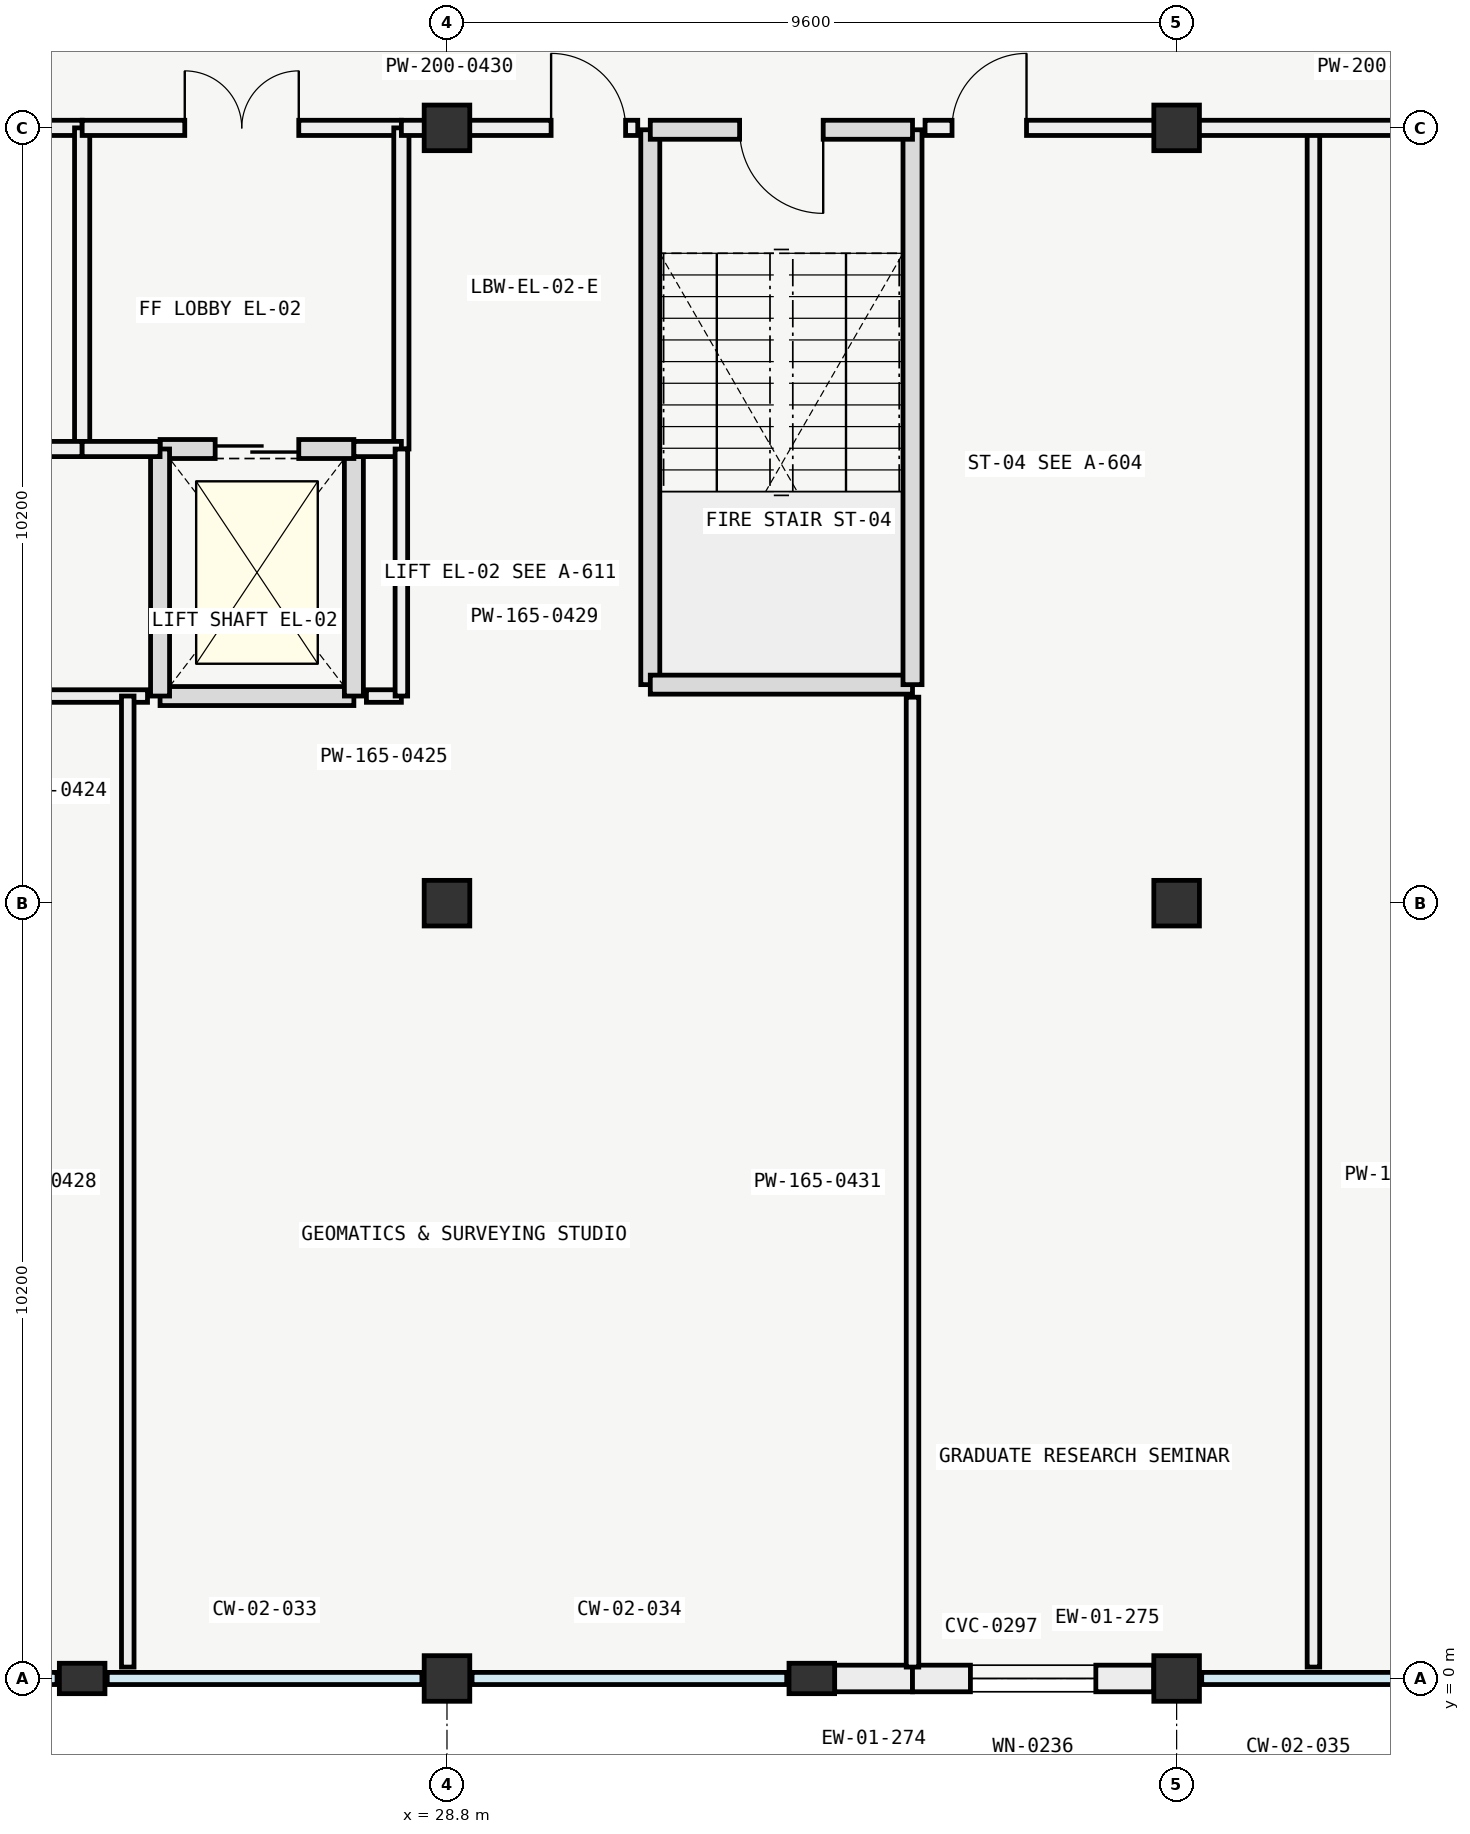
"""IFC4 building model, lengths in metres.
Left out: names, types, materials, properties, quantities, classifications, styles, units other than length and angle.
Written with IfcOpenShell. Run it as: python <this file> out.ifc"""

import sys

from ifc_helpers import new_model, si_unit, direction, frame, frame_2d, origin, origin_2d, place, context, subcontext, project, spatial, rectangle, extrude, element, fill, save


model = new_model("IFC4")
c1 = context("Model", 3, precision=1e-05, world=origin(), true_north=direction((0.0, 1.0)))
c2 = subcontext(c1, "Body", "Model", "MODEL_VIEW")
j1 = project(units=[si_unit("LENGTHUNIT", "METRE"), si_unit("PLANEANGLEUNIT", "RADIAN")], contexts=[c1])
p1 = place(None, origin())
s1 = spatial("IfcSite", under=j1, at=p1, CompositionType="ELEMENT")
p2 = place(p1, origin())
s2 = spatial("IfcBuilding", under=s1, at=p2, CompositionType="ELEMENT")
p3 = place(p2, frame((0.0, 0.0, 18.0)))
s3 = spatial("IfcBuildingStorey", under=s2, at=p3, CompositionType="ELEMENT", Elevation=18.0)
for number, where, z_axis, x_axis in (
    (1, (28.8, 0.0, 0.0), (0.0, 0.0, 1.0), (1.0, 0.0, 0.0)),
    (2, (28.8, 10.2, 0.0), (0.0, 0.0, 1.0), (1.0, 0.0, 0.0)),
    (3, (28.8, 20.4, 0.0), (0.0, 0.0, 1.0), (1.0, 0.0, 0.0)),
    (4, (38.4, 0.0, 0.0), (0.0, 0.0, 1.0), (1.0, 0.0, 0.0)),
    (5, (38.4, 10.2, 0.0), (0.0, 0.0, 1.0), (1.0, 0.0, 0.0)),
    (6, (38.4, 20.4, 0.0), (0.0, 0.0, 1.0), (1.0, 0.0, 0.0)),
):
    element("IfcColumn", number, at=place(p3, frame(where, z_axis=z_axis, x_axis=x_axis)), inside=s3, PredefinedType="COLUMN", context=c2, shape_type="SweptSolid", body=[
        extrude(rectangle(XDim=0.6, YDim=0.6, at=origin_2d()), origin(), (0.0, 0.0, 1.0), 4.2),
    ])
for number, where, z_axis, x_axis in (
    (7, (24.0, 0.0, 0.0), (0.0, 0.0, 1.0), (0.0, 1.0, 0.0)),
    (8, (33.6, 0.0, 0.0), (0.0, 0.0, 1.0), (0.0, 1.0, 0.0)),
):
    element("IfcColumn", number, at=place(p3, frame(where, z_axis=z_axis, x_axis=x_axis)), inside=s3, PredefinedType="PILASTER", context=c2, shape_type="SweptSolid", body=[
        extrude(rectangle(XDim=0.4, YDim=0.6, at=origin_2d()), origin(), (0.0, 0.0, 1.0), 4.2),
    ])
p4 = place(p3, frame((34.925, 0.0, 0.0), z_axis=(0.0, 0.0, 1.0), x_axis=(-1.0, 0.0, 0.0)))
e9 = element("IfcWall", 9, at=p4, inside=s3, PredefinedType="SOLIDWALL", context=c2, shape_type="SweptSolid", body=[
    extrude(rectangle(XDim=1.024, YDim=0.35, at=frame_2d((0.512, 0.0))), origin(), (0.0, 0.0, 1.0), 3.25),
])
p5 = place(p3, frame((38.099, 0.0, 0.0), z_axis=(0.0, 0.0, 1.0), x_axis=(-1.0, 0.0, 0.0)))
e10 = element("IfcWall", 10, at=p5, inside=s3, PredefinedType="SOLIDWALL", context=c2, shape_type="SweptSolid", body=[
    extrude(rectangle(XDim=3.174, YDim=0.35, at=frame_2d((1.587, 0.0))), origin(), (0.0, 0.0, 1.0), 3.25),
])
p6 = place(p5, frame((0.762, 0.0, 0.8)))
e11 = element("IfcOpeningElement", 11, at=p6, cuts=e10, PredefinedType="OPENING", context=c2, shape_type="SweptSolid", body=[
    extrude(rectangle(XDim=1.65, YDim=2.0, at=frame_2d((0.825, 1.0))), frame((0.0, 0.185, 0.0), z_axis=(0.0, -1.0, 0.0), x_axis=(1.0, 0.0, 0.0)), (0.0, 0.0, 1.0), 0.37),
])
p7 = place(p3, frame((31.475, 20.375, 0.0), z_axis=(0.0, 0.0, 1.0), x_axis=(0.0, -1.0, 0.0)))
e12 = element("IfcWall", 12, at=p7, inside=s3, PredefinedType="SOLIDWALL", context=c2, shape_type="SweptSolid", body=[
    extrude(rectangle(XDim=7.3, YDim=0.25, at=frame_2d((3.65, 0.0))), origin(), (0.0, 0.0, 1.0), 3.95),
])
p8 = place(p3, frame((31.475, 13.075, 0.0), z_axis=(0.0, 0.0, 1.0), x_axis=(1.0, 0.0, 0.0)))
e13 = element("IfcWall", 13, at=p8, inside=s3, PredefinedType="SOLIDWALL", context=c2, shape_type="SweptSolid", body=[
    extrude(rectangle(XDim=3.45, YDim=0.25, at=frame_2d((1.725, 0.0))), origin(), (0.0, 0.0, 1.0), 3.95),
])
p9 = place(p3, frame((34.925, 13.075, 0.0), z_axis=(0.0, 0.0, 1.0), x_axis=(0.0, 1.0, 0.0)))
e14 = element("IfcWall", 14, at=p9, inside=s3, PredefinedType="SOLIDWALL", context=c2, shape_type="SweptSolid", body=[
    extrude(rectangle(XDim=7.3, YDim=0.25, at=frame_2d((3.65, 0.0))), origin(), (0.0, 0.0, 1.0), 3.95),
])
p10 = place(p3, frame((34.925, 20.375, 0.0), z_axis=(0.0, 0.0, 1.0), x_axis=(-1.0, 0.0, 0.0)))
e15 = element("IfcWall", 15, at=p10, inside=s3, PredefinedType="SOLIDWALL", context=c2, shape_type="SweptSolid", body=[
    extrude(rectangle(XDim=3.45, YDim=0.25, at=frame_2d((1.725, 0.0))), origin(), (0.0, 0.0, 1.0), 3.95),
])
p11 = place(p10, frame((1.175, 0.0, 0.0)))
e16 = element("IfcOpeningElement", 16, at=p11, cuts=e15, PredefinedType="OPENING", context=c2, shape_type="SweptSolid", body=[
    extrude(rectangle(XDim=1.1, YDim=2.2, at=frame_2d((0.55, 1.1))), frame((0.0, 0.135, 0.0), z_axis=(0.0, -1.0, 0.0), x_axis=(1.0, 0.0, 0.0)), (0.0, 0.0, 1.0), 0.27),
])
p12 = place(p3, frame((19.8, 20.4, 0.0), z_axis=(0.0, 0.0, 1.0), x_axis=(1.0, 0.0, 0.0)))
e17 = element("IfcWall", 17, at=p12, inside=s3, PredefinedType="PARTITIONING", context=c2, shape_type="SweptSolid", body=[
    extrude(rectangle(XDim=4.2, YDim=0.2, at=frame_2d((2.1, 0.0))), origin(), (0.0, 0.0, 1.0), 3.33),
])
p13 = place(p12, frame((1.35, 0.0, 0.0)))
e18 = element("IfcOpeningElement", 18, at=p13, cuts=e17, PredefinedType="OPENING", context=c2, shape_type="SweptSolid", body=[
    extrude(rectangle(XDim=1.5, YDim=2.2, at=frame_2d((0.75, 1.1))), frame((0.0, 0.11, 0.0), z_axis=(0.0, -1.0, 0.0), x_axis=(1.0, 0.0, 0.0)), (0.0, 0.0, 1.0), 0.22),
])
p14 = place(p3, frame((24.0, 16.175, 0.0), z_axis=(0.0, 0.0, 1.0), x_axis=(0.0, 1.0, 0.0)))
e19 = element("IfcWall", 19, at=p14, inside=s3, PredefinedType="PARTITIONING", context=c2, shape_type="SweptSolid", body=[
    extrude(rectangle(XDim=4.225, YDim=0.2, at=frame_2d((2.112, 0.0))), origin(), (0.0, 0.0, 1.0), 3.33),
])
p15 = place(p3, frame((22.975, 16.175, 0.0), z_axis=(0.0, 0.0, 1.0), x_axis=(1.0, 0.0, 0.0)))
e20 = element("IfcWall", 20, at=p15, inside=s3, PredefinedType="PARTITIONING", context=c2, shape_type="SweptSolid", body=[
    extrude(rectangle(XDim=1.025, YDim=0.2, at=frame_2d((0.512, 0.0))), origin(), (0.0, 0.0, 1.0), 3.55),
])
p16 = place(p3, frame((25.025, 12.925, 0.0), z_axis=(0.0, 0.0, 1.0), x_axis=(1.0, 0.0, 0.0)))
e21 = element("IfcWall", 21, at=p16, inside=s3, PredefinedType="SOLIDWALL", context=c2, shape_type="SweptSolid", body=[
    extrude(rectangle(XDim=2.55, YDim=0.25, at=frame_2d((1.275, 0.0))), origin(), (0.0, 0.0, 1.0), 3.95),
])
p17 = place(p3, frame((27.575, 12.925, 0.0), z_axis=(0.0, 0.0, 1.0), x_axis=(0.0, 1.0, 0.0)))
e22 = element("IfcWall", 22, at=p17, inside=s3, PredefinedType="SOLIDWALL", context=c2, shape_type="SweptSolid", body=[
    extrude(rectangle(XDim=3.25, YDim=0.25, at=frame_2d((1.625, 0.0))), origin(), (0.0, 0.0, 1.0), 3.95),
])
p18 = place(p3, frame((27.575, 16.175, 0.0), z_axis=(0.0, 0.0, 1.0), x_axis=(-1.0, 0.0, 0.0)))
e23 = element("IfcWall", 23, at=p18, inside=s3, PredefinedType="SOLIDWALL", context=c2, shape_type="SweptSolid", body=[
    extrude(rectangle(XDim=2.55, YDim=0.25, at=frame_2d((1.275, 0.0))), origin(), (0.0, 0.0, 1.0), 3.95),
])
p19 = place(p18, frame((0.725, 0.0, 0.0)))
e24 = element("IfcOpeningElement", 24, at=p19, cuts=e23, PredefinedType="OPENING", context=c2, shape_type="SweptSolid", body=[
    extrude(rectangle(XDim=1.1, YDim=2.1, at=frame_2d((0.55, 1.05))), frame((0.0, 0.135, 0.0), z_axis=(0.0, -1.0, 0.0), x_axis=(1.0, 0.0, 0.0)), (0.0, 0.0, 1.0), 0.27),
])
p20 = place(p3, frame((25.025, 16.175, 0.0), z_axis=(0.0, 0.0, 1.0), x_axis=(0.0, -1.0, 0.0)))
e25 = element("IfcWall", 25, at=p20, inside=s3, PredefinedType="SOLIDWALL", context=c2, shape_type="SweptSolid", body=[
    extrude(rectangle(XDim=3.25, YDim=0.25, at=frame_2d((1.625, 0.0))), origin(), (0.0, 0.0, 1.0), 3.95),
])
p21 = place(p3, frame((24.0, 20.4, 0.0), z_axis=(0.0, 0.0, 1.0), x_axis=(1.0, 0.0, 0.0)))
e26 = element("IfcWall", 26, at=p21, inside=s3, PredefinedType="PARTITIONING", context=c2, shape_type="SweptSolid", body=[
    extrude(rectangle(XDim=4.2, YDim=0.2, at=frame_2d((2.1, 0.0))), origin(), (0.0, 0.0, 1.0), 3.33),
])
p22 = place(p21, frame((1.35, 0.0, 0.0)))
e27 = element("IfcOpeningElement", 27, at=p22, cuts=e26, PredefinedType="OPENING", context=c2, shape_type="SweptSolid", body=[
    extrude(rectangle(XDim=1.5, YDim=2.2, at=frame_2d((0.75, 1.1))), frame((0.0, 0.11, 0.0), z_axis=(0.0, -1.0, 0.0), x_axis=(1.0, 0.0, 0.0)), (0.0, 0.0, 1.0), 0.22),
])
p23 = place(p3, frame((28.2, 16.175, 0.0), z_axis=(0.0, 0.0, 1.0), x_axis=(0.0, 1.0, 0.0)))
e28 = element("IfcWall", 28, at=p23, inside=s3, PredefinedType="PARTITIONING", context=c2, shape_type="SweptSolid", body=[
    extrude(rectangle(XDim=4.225, YDim=0.2, at=frame_2d((2.112, 0.0))), origin(), (0.0, 0.0, 1.0), 3.33),
])
p24 = place(p3, frame((24.0, 16.175, 0.0), z_axis=(0.0, 0.0, 1.0), x_axis=(1.0, 0.0, 0.0)))
e29 = element("IfcWall", 29, at=p24, inside=s3, PredefinedType="PARTITIONING", context=c2, shape_type="SweptSolid", body=[
    extrude(rectangle(XDim=1.025, YDim=0.2, at=frame_2d((0.512, 0.0))), origin(), (0.0, 0.0, 1.0), 3.55),
])
p25 = place(p3, frame((27.575, 16.175, 0.0), z_axis=(0.0, 0.0, 1.0), x_axis=(1.0, 0.0, 0.0)))
e30 = element("IfcWall", 30, at=p25, inside=s3, PredefinedType="PARTITIONING", context=c2, shape_type="SweptSolid", body=[
    extrude(rectangle(XDim=0.625, YDim=0.2, at=frame_2d((0.312, 0.0))), origin(), (0.0, 0.0, 1.0), 3.55),
])
p26 = place(p3, frame((23.14, 12.925, 0.0), z_axis=(0.0, 0.0, 1.0), x_axis=(1.0, 0.0, 0.0)))
e31 = element("IfcWall", 31, at=p26, inside=s3, PredefinedType="PARTITIONING", context=c2, shape_type="SweptSolid", body=[
    extrude(rectangle(XDim=1.72, YDim=0.165, at=frame_2d((0.86, 0.0))), origin(), (0.0, 0.0, 1.0), 3.85),
])
p27 = place(p3, frame((27.74, 12.925, 0.0), z_axis=(0.0, 0.0, 1.0), x_axis=(1.0, 0.0, 0.0)))
e32 = element("IfcWall", 32, at=p27, inside=s3, PredefinedType="PARTITIONING", context=c2, shape_type="SweptSolid", body=[
    extrude(rectangle(XDim=0.46, YDim=0.165, at=frame_2d((0.23, 0.0))), origin(), (0.0, 0.0, 1.0), 3.85),
])
p28 = place(p3, frame((24.6, 0.15, 0.0), z_axis=(0.0, 0.0, 1.0), x_axis=(0.0, 1.0, 0.0)))
e33 = element("IfcWall", 33, at=p28, inside=s3, PredefinedType="PARTITIONING", context=c2, shape_type="SweptSolid", body=[
    extrude(rectangle(XDim=12.775, YDim=0.165, at=frame_2d((6.388, 0.0))), origin(), (0.0, 0.0, 1.0), 3.33),
])
p29 = place(p3, frame((28.2, 12.925, 0.0), z_axis=(0.0, 0.0, 1.0), x_axis=(0.0, 1.0, 0.0)))
e34 = element("IfcWall", 34, at=p29, inside=s3, PredefinedType="PARTITIONING", context=c2, shape_type="SweptSolid", body=[
    extrude(rectangle(XDim=3.25, YDim=0.165, at=frame_2d((1.625, 0.0))), origin(), (0.0, 0.0, 1.0), 3.85),
])
p30 = place(p3, frame((28.2, 20.4, 0.0), z_axis=(0.0, 0.0, 1.0), x_axis=(1.0, 0.0, 0.0)))
e35 = element("IfcWall", 35, at=p30, inside=s3, PredefinedType="PARTITIONING", context=c2, shape_type="SweptSolid", body=[
    extrude(rectangle(XDim=3.11, YDim=0.2, at=frame_2d((1.555, 0.0))), origin(), (0.0, 0.0, 1.0), 3.28),
])
p31 = place(p30, frame((1.97, 0.0, 0.0)))
e36 = element("IfcOpeningElement", 36, at=p31, cuts=e35, PredefinedType="OPENING", context=c2, shape_type="SweptSolid", body=[
    extrude(rectangle(XDim=0.98, YDim=2.15, at=frame_2d((0.49, 1.075))), frame((0.0, 0.11, 0.0), z_axis=(0.0, -1.0, 0.0), x_axis=(1.0, 0.0, 0.0)), (0.0, 0.0, 1.0), 0.22),
])
p32 = place(p3, frame((34.925, 0.15, 0.0), z_axis=(0.0, 0.0, 1.0), x_axis=(0.0, 1.0, 0.0)))
e37 = element("IfcWall", 37, at=p32, inside=s3, PredefinedType="PARTITIONING", context=c2, shape_type="SweptSolid", body=[
    extrude(rectangle(XDim=12.76, YDim=0.165, at=frame_2d((6.38, 0.0))), origin(), (0.0, 0.0, 1.0), 3.33),
])
p33 = place(p3, frame((40.2, 0.15, 0.0), z_axis=(0.0, 0.0, 1.0), x_axis=(0.0, 1.0, 0.0)))
e38 = element("IfcWall", 38, at=p33, inside=s3, PredefinedType="PARTITIONING", context=c2, shape_type="SweptSolid", body=[
    extrude(rectangle(XDim=20.25, YDim=0.165, at=frame_2d((10.125, 0.0))), origin(), (0.0, 0.0, 1.0), 2.33),
])
p34 = place(p3, frame((35.09, 20.4, 0.0), z_axis=(0.0, 0.0, 1.0), x_axis=(1.0, 0.0, 0.0)))
e39 = element("IfcWall", 39, at=p34, inside=s3, PredefinedType="PARTITIONING", context=c2, shape_type="SweptSolid", body=[
    extrude(rectangle(XDim=12.76, YDim=0.2, at=frame_2d((6.38, 0.0))), origin(), (0.0, 0.0, 1.0), 2.33),
])
p35 = place(p34, frame((0.355, 0.0, 0.0)))
e40 = element("IfcOpeningElement", 40, at=p35, cuts=e39, PredefinedType="OPENING", context=c2, shape_type="SweptSolid", body=[
    extrude(rectangle(XDim=0.98, YDim=2.15, at=frame_2d((0.49, 1.075))), frame((0.0, 0.11, 0.0), z_axis=(0.0, -1.0, 0.0), x_axis=(1.0, 0.0, 0.0)), (0.0, 0.0, 1.0), 0.22),
])
p36 = place(p34, frame((10.66, 0.0, 0.0)))
e41 = element("IfcOpeningElement", 41, at=p36, cuts=e39, PredefinedType="OPENING", context=c2, shape_type="SweptSolid", body=[
    extrude(rectangle(XDim=0.98, YDim=2.15, at=frame_2d((0.49, 1.075))), frame((0.0, 0.11, 0.0), z_axis=(0.0, -1.0, 0.0), x_axis=(1.0, 0.0, 0.0)), (0.0, 0.0, 1.0), 0.22),
])
p37 = place(p6, origin())
e42 = element("IfcWindow", 42, at=p37, inside=s3, PartitioningType="SINGLE_PANEL", PredefinedType="WINDOW", context=c2, shape_type="SweptSolid", body=[
    extrude(rectangle(XDim=1.65, YDim=2.0, at=frame_2d((0.825, 1.0))), frame((0.0, 0.03, 0.0), z_axis=(0.0, -1.0, 0.0), x_axis=(1.0, 0.0, 0.0)), (0.0, 0.0, 1.0), 0.06),
])
fill(e11, e42)
p38 = place(p11, origin())
e43 = element("IfcDoor", 43, at=p38, inside=s3, OperationType="SINGLE_SWING_LEFT", PredefinedType="DOOR", context=c2, shape_type="SweptSolid", body=[
    extrude(rectangle(XDim=1.1, YDim=2.2, at=frame_2d((0.55, 1.1))), frame((0.0, 0.025, 0.0), z_axis=(0.0, -1.0, 0.0), x_axis=(1.0, 0.0, 0.0)), (0.0, 0.0, 1.0), 0.05),
])
fill(e16, e43)
p39 = place(p19, origin())
e44 = element("IfcDoor", 44, at=p39, inside=s3, OperationType="SLIDING_TO_LEFT", PredefinedType="DOOR", context=c2, shape_type="SweptSolid", body=[
    extrude(rectangle(XDim=1.1, YDim=2.1, at=frame_2d((0.55, 1.05))), frame((0.0, 0.025, 0.0), z_axis=(0.0, -1.0, 0.0), x_axis=(1.0, 0.0, 0.0)), (0.0, 0.0, 1.0), 0.05),
])
fill(e24, e44)
p40 = place(p22, origin())
e45 = element("IfcDoor", 45, at=p40, inside=s3, OperationType="SINGLE_SWING_LEFT", PredefinedType="DOOR", context=c2, shape_type="SweptSolid", body=[
    extrude(rectangle(XDim=1.5, YDim=2.2, at=frame_2d((0.75, 1.1))), frame((0.0, 0.025, 0.0), z_axis=(0.0, -1.0, 0.0), x_axis=(1.0, 0.0, 0.0)), (0.0, 0.0, 1.0), 0.05),
])
fill(e27, e45)
p41 = place(p31, origin())
e46 = element("IfcDoor", 46, at=p41, inside=s3, OperationType="SINGLE_SWING_LEFT", PredefinedType="DOOR", context=c2, shape_type="SweptSolid", body=[
    extrude(rectangle(XDim=0.98, YDim=2.15, at=frame_2d((0.49, 1.075))), frame((0.0, 0.025, 0.0), z_axis=(0.0, -1.0, 0.0), x_axis=(1.0, 0.0, 0.0)), (0.0, 0.0, 1.0), 0.05),
])
fill(e36, e46)
p42 = place(p35, origin())
e47 = element("IfcDoor", 47, at=p42, inside=s3, OperationType="SINGLE_SWING_RIGHT", PredefinedType="DOOR", context=c2, shape_type="SweptSolid", body=[
    extrude(rectangle(XDim=0.98, YDim=2.15, at=frame_2d((0.49, 1.075))), frame((0.0, 0.025, 0.0), z_axis=(0.0, -1.0, 0.0), x_axis=(1.0, 0.0, 0.0)), (0.0, 0.0, 1.0), 0.05),
])
fill(e40, e47)
save(model, sys.argv[1])
